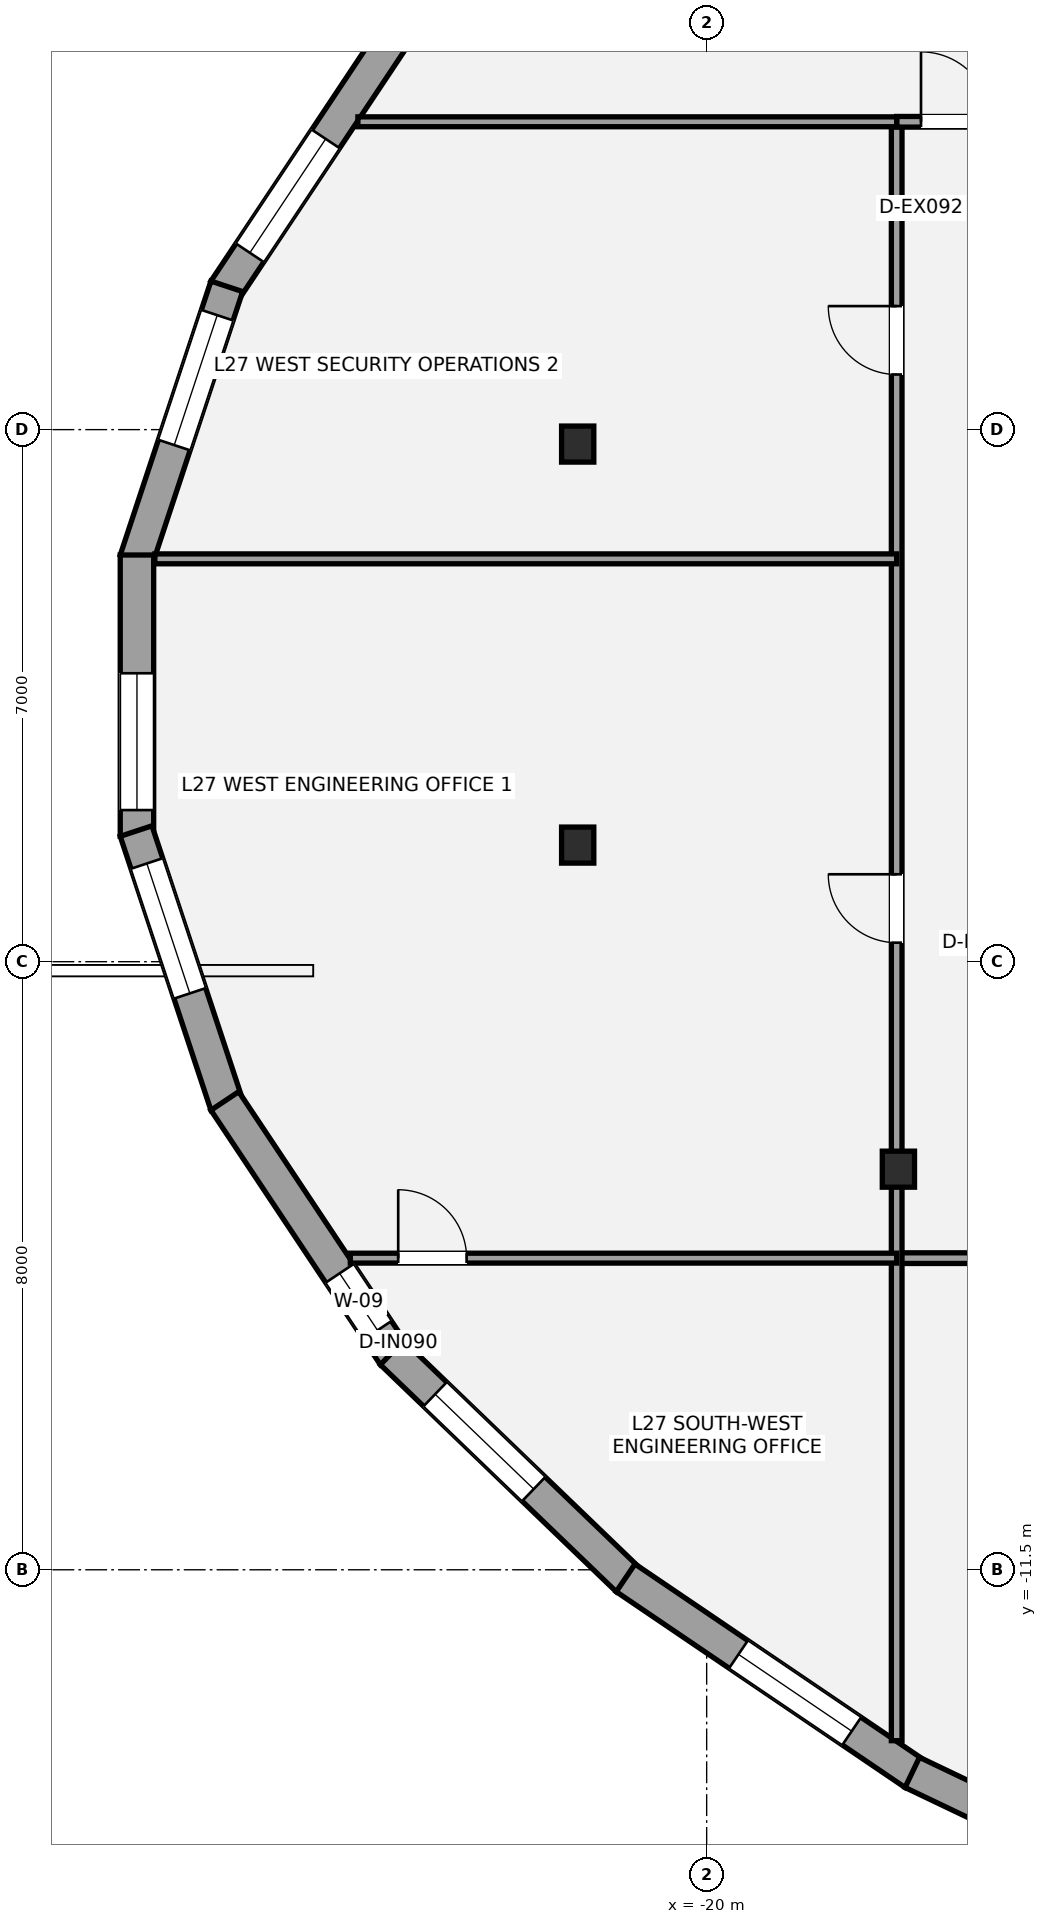
"""IFC4 building model, lengths in metres.
Left out: names, types, materials, properties, quantities, classifications, styles, units other than length and angle.
Written with IfcOpenShell. Run it as: python <this file> out.ifc"""

import sys

from ifc_helpers import new_model, si_unit, direction, frame, frame_2d, origin, origin_2d, place, context, subcontext, project, spatial, rectangle, i_section, extrude, element, fill, save


model = new_model("IFC4")
c1 = context("Model", 3, precision=1e-05, world=origin(), true_north=direction((0.0, 1.0)))
c2 = subcontext(c1, "Body", "Model", "MODEL_VIEW")
j1 = project(units=[si_unit("LENGTHUNIT", "METRE"), si_unit("PLANEANGLEUNIT", "RADIAN")], contexts=[c1])
p1 = place(None, origin())
s1 = spatial("IfcSite", under=j1, at=p1, CompositionType="ELEMENT")
p2 = place(p1, origin())
s2 = spatial("IfcBuilding", under=s1, at=p2, CompositionType="ELEMENT")
p3 = place(p2, frame((0.0, 0.0, 103.6)))
s3 = spatial("IfcBuildingStorey", under=s2, at=p3, CompositionType="ELEMENT", Elevation=103.6)
for number, where, z_axis, x_axis in (
    (1, (-21.697, 3.31, 0.0), (0.0, 0.0, 1.0), (1.0, 0.0, 0.0)),
    (2, (-21.697, -1.966, 0.0), (0.0, 0.0, 1.0), (1.0, 0.0, 0.0)),
    (3, (-17.477, -6.229, 0.0), (0.0, 0.0, 1.0), (1.0, 0.0, 0.0)),
):
    element("IfcColumn", number, at=place(p3, frame(where, z_axis=z_axis, x_axis=x_axis)), inside=s3, PredefinedType="COLUMN", context=c2, shape_type="SweptSolid", body=[
        extrude(i_section(OverallWidth=0.424, OverallDepth=0.474, WebThickness=0.048, FlangeThickness=0.077, at=origin_2d()), origin(), (0.0, 0.0, 1.0), 3.5),
    ])
p4 = place(p3, frame((-26.34, 5.332, 0.0), z_axis=(0.0, 0.0, 1.0), x_axis=(0.554293965046, 0.83232097193, 0.0)))
e4 = element("IfcWall", 4, at=p4, inside=s3, PredefinedType="STANDARD", context=c2, shape_type="SweptSolid", body=[
    extrude(rectangle(XDim=4.023, YDim=0.44, at=frame_2d((2.011, 0.0))), origin(), (0.0, 0.0, 1.0), 2.528),
])
p5 = place(p4, frame((0.594, 0.0, 0.65)))
e5 = element("IfcOpeningElement", 5, at=p5, cuts=e4, PredefinedType="OPENING", context=c2, shape_type="SweptSolid", body=[
    extrude(rectangle(XDim=1.8, YDim=1.7, at=frame_2d((0.9, 0.85))), frame((0.0, 0.23, 0.0), z_axis=(0.0, -1.0, 0.0), x_axis=(1.0, 0.0, 0.0)), (0.0, 0.0, 1.0), 0.46),
])
p6 = place(p3, frame((-27.507, 1.781, 0.0), z_axis=(0.0, 0.0, 1.0), x_axis=(0.314316911692, 0.94931811266, 0.0)))
e6 = element("IfcWall", 6, at=p6, inside=s3, PredefinedType="STANDARD", context=c2, shape_type="SweptSolid", body=[
    extrude(rectangle(XDim=3.796, YDim=0.44, at=frame_2d((1.898, 0.0))), origin(), (0.0, 0.0, 1.0), 2.528),
])
p7 = place(p6, frame((1.596, 0.0, 0.65)))
e7 = element("IfcOpeningElement", 7, at=p7, cuts=e6, PredefinedType="OPENING", context=c2, shape_type="SweptSolid", body=[
    extrude(rectangle(XDim=1.8, YDim=1.7, at=frame_2d((0.9, 0.85))), frame((0.0, 0.23, 0.0), z_axis=(0.0, -1.0, 0.0), x_axis=(1.0, 0.0, 0.0)), (0.0, 0.0, 1.0), 0.46),
])
p8 = place(p3, frame((-27.496, -1.851, 0.0), z_axis=(0.0, 0.0, 1.0), x_axis=(0.0, 1.0, 0.0)))
e8 = element("IfcWall", 8, at=p8, inside=s3, PredefinedType="STANDARD", context=c2, shape_type="SweptSolid", body=[
    extrude(rectangle(XDim=3.701, YDim=0.44, at=frame_2d((1.851, 0.0))), origin(), (0.0, 0.0, 1.0), 2.528),
])
p9 = place(p8, frame((0.345, 0.0, 0.65)))
e9 = element("IfcOpeningElement", 9, at=p9, cuts=e8, PredefinedType="OPENING", context=c2, shape_type="SweptSolid", body=[
    extrude(rectangle(XDim=1.8, YDim=1.7, at=frame_2d((0.9, 0.85))), frame((0.0, 0.23, 0.0), z_axis=(0.0, -1.0, 0.0), x_axis=(1.0, 0.0, 0.0)), (0.0, 0.0, 1.0), 0.46),
])
p10 = place(p3, frame((-26.314, -5.385, 0.0), z_axis=(0.0, 0.0, 1.0), x_axis=(-0.314316911692, 0.94931811266, 0.0)))
e10 = element("IfcWall", 10, at=p10, inside=s3, PredefinedType="STANDARD", context=c2, shape_type="SweptSolid", body=[
    extrude(rectangle(XDim=3.796, YDim=0.44, at=frame_2d((1.898, 0.0))), origin(), (0.0, 0.0, 1.0), 2.528),
])
p11 = place(p10, frame((1.547, 0.0, 0.65)))
e11 = element("IfcOpeningElement", 11, at=p11, cuts=e10, PredefinedType="OPENING", context=c2, shape_type="SweptSolid", body=[
    extrude(rectangle(XDim=1.8, YDim=1.7, at=frame_2d((0.9, 0.85))), frame((0.0, 0.23, 0.0), z_axis=(0.0, -1.0, 0.0), x_axis=(1.0, 0.0, 0.0)), (0.0, 0.0, 1.0), 0.46),
])
p12 = place(p3, frame((-24.11, -8.68, 0.0), z_axis=(0.0, 0.0, 1.0), x_axis=(-0.554293965046, 0.83232097193, 0.0)))
e12 = element("IfcWall", 12, at=p12, inside=s3, PredefinedType="STANDARD", context=c2, shape_type="SweptSolid", body=[
    extrude(rectangle(XDim=4.023, YDim=0.44, at=frame_2d((2.011, 0.0))), origin(), (0.0, 0.0, 1.0), 2.528),
])
p13 = place(p12, frame((0.398, 0.0, 0.58)))
e13 = element("IfcOpeningElement", 13, at=p13, cuts=e12, PredefinedType="OPENING", context=c2, shape_type="SweptSolid", body=[
    extrude(rectangle(XDim=0.9, YDim=1.35, at=frame_2d((0.45, 0.675))), frame((0.0, 0.23, 0.0), z_axis=(0.0, -1.0, 0.0), x_axis=(1.0, 0.0, 0.0)), (0.0, 0.0, 1.0), 0.46),
])
p14 = place(p3, frame((-21.037, -11.63, 0.0), z_axis=(0.0, 0.0, 1.0), x_axis=(-0.720581378362, 0.693370375166, 0.0)))
e14 = element("IfcWall", 14, at=p14, inside=s3, PredefinedType="STANDARD", context=c2, shape_type="SweptSolid", body=[
    extrude(rectangle(XDim=4.307, YDim=0.44, at=frame_2d((2.153, 0.0))), origin(), (0.0, 0.0, 1.0), 2.528),
])
p15 = place(p14, frame((1.719, 0.0, 0.65)))
e15 = element("IfcOpeningElement", 15, at=p15, cuts=e14, PredefinedType="OPENING", context=c2, shape_type="SweptSolid", body=[
    extrude(rectangle(XDim=1.8, YDim=1.7, at=frame_2d((0.9, 0.85))), frame((0.0, 0.23, 0.0), z_axis=(0.0, -1.0, 0.0), x_axis=(1.0, 0.0, 0.0)), (0.0, 0.0, 1.0), 0.46),
])
p16 = place(p3, frame((-17.266, -14.182, 0.0), z_axis=(0.0, 0.0, 1.0), x_axis=(-0.827754551165, 0.56109036975, 0.0)))
e16 = element("IfcWall", 16, at=p16, inside=s3, PredefinedType="STANDARD", context=c2, shape_type="SweptSolid", body=[
    extrude(rectangle(XDim=4.591, YDim=0.44, at=frame_2d((2.295, 0.0))), origin(), (0.0, 0.0, 1.0), 2.528),
])
p17 = place(p16, frame((0.997, 0.0, 0.65)))
e17 = element("IfcOpeningElement", 17, at=p17, cuts=e16, PredefinedType="OPENING", context=c2, shape_type="SweptSolid", body=[
    extrude(rectangle(XDim=1.8, YDim=1.7, at=frame_2d((0.9, 0.85))), frame((0.0, 0.23, 0.0), z_axis=(0.0, -1.0, 0.0), x_axis=(1.0, 0.0, 0.0)), (0.0, 0.0, 1.0), 0.46),
])
p18 = place(p3, frame((-12.89, -16.27, 0.0), z_axis=(0.0, 0.0, 1.0), x_axis=(-0.902372757907, 0.430956385018, 0.0)))
e18 = element("IfcWall", 18, at=p18, inside=s3, PredefinedType="STANDARD", context=c2, shape_type="SweptSolid", body=[
    extrude(rectangle(XDim=4.882, YDim=0.44, at=frame_2d((2.441, 0.0))), origin(), (0.0, 0.0, 1.0), 2.528),
])
p19 = place(p18, frame((1.888, 0.0, 0.65)))
e19 = element("IfcOpeningElement", 19, at=p19, cuts=e18, PredefinedType="OPENING", context=c2, shape_type="SweptSolid", body=[
    extrude(rectangle(XDim=1.8, YDim=1.7, at=frame_2d((0.9, 0.85))), frame((0.0, 0.23, 0.0), z_axis=(0.0, -1.0, 0.0), x_axis=(1.0, 0.0, 0.0)), (0.0, 0.0, 1.0), 0.46),
])
p20 = place(p3, frame((-17.5, -7.4, 0.0), z_axis=(0.0, 0.0, 1.0), x_axis=(1.0, 0.0, 0.0)))
e20 = element("IfcWall", 20, at=p20, inside=s3, PredefinedType="PARTITIONING", context=c2, shape_type="SweptSolid", body=[
    extrude(rectangle(XDim=33.2, YDim=0.14, at=frame_2d((16.6, 0.0))), origin(), (0.0, 0.0, 1.0), 2.688),
])
p21 = place(p20, frame((6.3, 0.0, 0.0)))
e21 = element("IfcOpeningElement", 21, at=p21, cuts=e20, PredefinedType="OPENING", context=c2, shape_type="SweptSolid", body=[
    extrude(rectangle(XDim=0.9, YDim=2.1, at=frame_2d((0.45, 1.05))), frame((0.0, 0.08, 0.0), z_axis=(0.0, -1.0, 0.0), x_axis=(1.0, 0.0, 0.0)), (0.0, 0.0, 1.0), 0.16),
])
p22 = place(p20, frame((18.05, 0.0, 0.0)))
e22 = element("IfcOpeningElement", 22, at=p22, cuts=e20, PredefinedType="OPENING", context=c2, shape_type="SweptSolid", body=[
    extrude(rectangle(XDim=0.9, YDim=2.1, at=frame_2d((0.45, 1.05))), frame((0.0, 0.08, 0.0), z_axis=(0.0, -1.0, 0.0), x_axis=(1.0, 0.0, 0.0)), (0.0, 0.0, 1.0), 0.16),
])
p23 = place(p20, frame((27.9, 0.0, 0.0)))
e23 = element("IfcOpeningElement", 23, at=p23, cuts=e20, PredefinedType="OPENING", context=c2, shape_type="SweptSolid", body=[
    extrude(rectangle(XDim=0.9, YDim=2.1, at=frame_2d((0.45, 1.05))), frame((0.0, 0.08, 0.0), z_axis=(0.0, -1.0, 0.0), x_axis=(1.0, 0.0, 0.0)), (0.0, 0.0, 1.0), 0.16),
])
p24 = place(p3, frame((-17.5, -13.748, 0.0), z_axis=(0.0, 0.0, 1.0), x_axis=(0.0, 1.0, 0.0)))
e24 = element("IfcWall", 24, at=p24, inside=s3, PredefinedType="PARTITIONING", context=c2, shape_type="SweptSolid", body=[
    extrude(rectangle(XDim=21.298, YDim=0.14, at=frame_2d((10.649, 0.0))), origin(), (0.0, 0.0, 1.0), 2.688),
])
p25 = place(p24, frame((10.499, 0.0, 0.0)))
e25 = element("IfcOpeningElement", 25, at=p25, cuts=e24, PredefinedType="OPENING", context=c2, shape_type="SweptSolid", body=[
    extrude(rectangle(XDim=0.9, YDim=2.1, at=frame_2d((0.45, 1.05))), frame((0.0, 0.08, 0.0), z_axis=(0.0, -1.0, 0.0), x_axis=(1.0, 0.0, 0.0)), (0.0, 0.0, 1.0), 0.16),
])
p26 = place(p24, frame((17.974, 0.0, 0.0)))
e26 = element("IfcOpeningElement", 26, at=p26, cuts=e24, PredefinedType="OPENING", context=c2, shape_type="SweptSolid", body=[
    extrude(rectangle(XDim=0.9, YDim=2.1, at=frame_2d((0.45, 1.05))), frame((0.0, 0.08, 0.0), z_axis=(0.0, -1.0, 0.0), x_axis=(1.0, 0.0, 0.0)), (0.0, 0.0, 1.0), 0.16),
])
p27 = place(p3, frame((-17.5, 7.55, 0.0), z_axis=(0.0, 0.0, 1.0), x_axis=(1.0, 0.0, 0.0)))
e27 = element("IfcWall", 27, at=p27, inside=s3, PredefinedType="PARTITIONING", context=c2, shape_type="SweptSolid", body=[
    extrude(rectangle(XDim=3.6, YDim=0.14, at=frame_2d((1.8, 0.0))), origin(), (0.0, 0.0, 1.0), 3.31),
])
p28 = place(p27, frame((0.32, 0.0, 0.0)))
e28 = element("IfcOpeningElement", 28, at=p28, cuts=e27, PredefinedType="OPENING", context=c2, shape_type="SweptSolid", body=[
    extrude(rectangle(XDim=0.92, YDim=2.15, at=frame_2d((0.46, 1.075))), frame((0.0, 0.08, 0.0), z_axis=(0.0, -1.0, 0.0), x_axis=(1.0, 0.0, 0.0)), (0.0, 0.0, 1.0), 0.16),
])
p29 = place(p3, frame((-24.589, 7.55, 0.0), z_axis=(0.0, 0.0, 1.0), x_axis=(1.0, 0.0, 0.0)))
e29 = element("IfcWall", 29, at=p29, inside=s3, PredefinedType="PARTITIONING", context=c2, shape_type="SweptSolid", body=[
    extrude(rectangle(XDim=7.089, YDim=0.13, at=frame_2d((3.544, 0.0))), origin(), (0.0, 0.0, 1.0), 2.763),
])
p30 = place(p3, frame((-24.689, -7.4, 0.0), z_axis=(0.0, 0.0, 1.0), x_axis=(1.0, 0.0, 0.0)))
e30 = element("IfcWall", 30, at=p30, inside=s3, PredefinedType="PARTITIONING", context=c2, shape_type="SweptSolid", body=[
    extrude(rectangle(XDim=7.189, YDim=0.13, at=frame_2d((3.594, 0.0))), origin(), (0.0, 0.0, 1.0), 2.763),
])
p31 = place(p30, frame((0.63, 0.0, 0.0)))
e31 = element("IfcOpeningElement", 31, at=p31, cuts=e30, PredefinedType="OPENING", context=c2, shape_type="SweptSolid", body=[
    extrude(rectangle(XDim=0.9, YDim=2.1, at=frame_2d((0.45, 1.05))), frame((0.0, 0.075, 0.0), z_axis=(0.0, -1.0, 0.0), x_axis=(1.0, 0.0, 0.0)), (0.0, 0.0, 1.0), 0.15),
])
p32 = place(p3, frame((-27.26, 1.8, 0.0), z_axis=(0.0, 0.0, 1.0), x_axis=(1.0, 0.0, 0.0)))
e32 = element("IfcWall", 32, at=p32, inside=s3, PredefinedType="PARTITIONING", context=c2, shape_type="SweptSolid", body=[
    extrude(rectangle(XDim=9.76, YDim=0.13, at=frame_2d((4.88, 0.0))), origin(), (0.0, 0.0, 1.0), 2.763),
])
p33 = place(p5, origin())
e33 = element("IfcWindow", 33, at=p33, inside=s3, PartitioningType="SINGLE_PANEL", PredefinedType="WINDOW", context=c2, shape_type="SweptSolid", body=[
    extrude(rectangle(XDim=1.8, YDim=1.7, at=frame_2d((0.9, 0.85))), frame((0.0, -0.01, 0.0), z_axis=(0.0, -1.0, 0.0), x_axis=(1.0, 0.0, 0.0)), (0.0, 0.0, 1.0), 0.06),
])
fill(e5, e33)
p34 = place(p7, origin())
e34 = element("IfcWindow", 34, at=p34, inside=s3, PartitioningType="SINGLE_PANEL", PredefinedType="WINDOW", context=c2, shape_type="SweptSolid", body=[
    extrude(rectangle(XDim=1.8, YDim=1.7, at=frame_2d((0.9, 0.85))), frame((0.0, -0.01, 0.0), z_axis=(0.0, -1.0, 0.0), x_axis=(1.0, 0.0, 0.0)), (0.0, 0.0, 1.0), 0.06),
])
fill(e7, e34)
p35 = place(p9, origin())
e35 = element("IfcWindow", 35, at=p35, inside=s3, PartitioningType="SINGLE_PANEL", PredefinedType="WINDOW", context=c2, shape_type="SweptSolid", body=[
    extrude(rectangle(XDim=1.8, YDim=1.7, at=frame_2d((0.9, 0.85))), frame((0.0, -0.01, 0.0), z_axis=(0.0, -1.0, 0.0), x_axis=(1.0, 0.0, 0.0)), (0.0, 0.0, 1.0), 0.06),
])
fill(e9, e35)
p36 = place(p11, origin())
e36 = element("IfcWindow", 36, at=p36, inside=s3, PartitioningType="SINGLE_PANEL", PredefinedType="WINDOW", context=c2, shape_type="SweptSolid", body=[
    extrude(rectangle(XDim=1.8, YDim=1.7, at=frame_2d((0.9, 0.85))), frame((0.0, -0.01, 0.0), z_axis=(0.0, -1.0, 0.0), x_axis=(1.0, 0.0, 0.0)), (0.0, 0.0, 1.0), 0.06),
])
fill(e11, e36)
p37 = place(p13, origin())
e37 = element("IfcWindow", 37, at=p37, inside=s3, PartitioningType="SINGLE_PANEL", PredefinedType="WINDOW", context=c2, shape_type="SweptSolid", body=[
    extrude(rectangle(XDim=0.9, YDim=1.35, at=frame_2d((0.45, 0.675))), frame((0.0, -0.01, 0.0), z_axis=(0.0, -1.0, 0.0), x_axis=(1.0, 0.0, 0.0)), (0.0, 0.0, 1.0), 0.06),
])
fill(e13, e37)
p38 = place(p15, origin())
e38 = element("IfcWindow", 38, at=p38, inside=s3, PartitioningType="SINGLE_PANEL", PredefinedType="WINDOW", context=c2, shape_type="SweptSolid", body=[
    extrude(rectangle(XDim=1.8, YDim=1.7, at=frame_2d((0.9, 0.85))), frame((0.0, -0.01, 0.0), z_axis=(0.0, -1.0, 0.0), x_axis=(1.0, 0.0, 0.0)), (0.0, 0.0, 1.0), 0.06),
])
fill(e15, e38)
p39 = place(p17, origin())
e39 = element("IfcWindow", 39, at=p39, inside=s3, PartitioningType="SINGLE_PANEL", PredefinedType="WINDOW", context=c2, shape_type="SweptSolid", body=[
    extrude(rectangle(XDim=1.8, YDim=1.7, at=frame_2d((0.9, 0.85))), frame((0.0, -0.01, 0.0), z_axis=(0.0, -1.0, 0.0), x_axis=(1.0, 0.0, 0.0)), (0.0, 0.0, 1.0), 0.06),
])
fill(e17, e39)
p40 = place(p28, origin())
e40 = element("IfcDoor", 40, at=p40, inside=s3, OperationType="SINGLE_SWING_LEFT", PredefinedType="DOOR", context=c2, shape_type="SweptSolid", body=[
    extrude(rectangle(XDim=0.92, YDim=2.15, at=frame_2d((0.46, 1.075))), frame((0.0, 0.025, 0.0), z_axis=(0.0, -1.0, 0.0), x_axis=(1.0, 0.0, 0.0)), (0.0, 0.0, 1.0), 0.05),
])
fill(e28, e40)
p41 = place(p31, origin())
e41 = element("IfcDoor", 41, at=p41, inside=s3, OperationType="SINGLE_SWING_LEFT", PredefinedType="DOOR", context=c2, shape_type="SweptSolid", body=[
    extrude(rectangle(XDim=0.9, YDim=2.1, at=frame_2d((0.45, 1.05))), frame((0.0, 0.025, 0.0), z_axis=(0.0, -1.0, 0.0), x_axis=(1.0, 0.0, 0.0)), (0.0, 0.0, 1.0), 0.05),
])
fill(e31, e41)
p42 = place(p25, origin())
e42 = element("IfcDoor", 42, at=p42, inside=s3, OperationType="SINGLE_SWING_RIGHT", PredefinedType="DOOR", context=c2, shape_type="SweptSolid", body=[
    extrude(rectangle(XDim=0.9, YDim=2.1, at=frame_2d((0.45, 1.05))), frame((0.0, 0.025, 0.0), z_axis=(0.0, -1.0, 0.0), x_axis=(1.0, 0.0, 0.0)), (0.0, 0.0, 1.0), 0.05),
])
fill(e25, e42)
p43 = place(p26, origin())
e43 = element("IfcDoor", 43, at=p43, inside=s3, OperationType="SINGLE_SWING_RIGHT", PredefinedType="DOOR", context=c2, shape_type="SweptSolid", body=[
    extrude(rectangle(XDim=0.9, YDim=2.1, at=frame_2d((0.45, 1.05))), frame((0.0, 0.025, 0.0), z_axis=(0.0, -1.0, 0.0), x_axis=(1.0, 0.0, 0.0)), (0.0, 0.0, 1.0), 0.05),
])
fill(e26, e43)
save(model, sys.argv[1])
